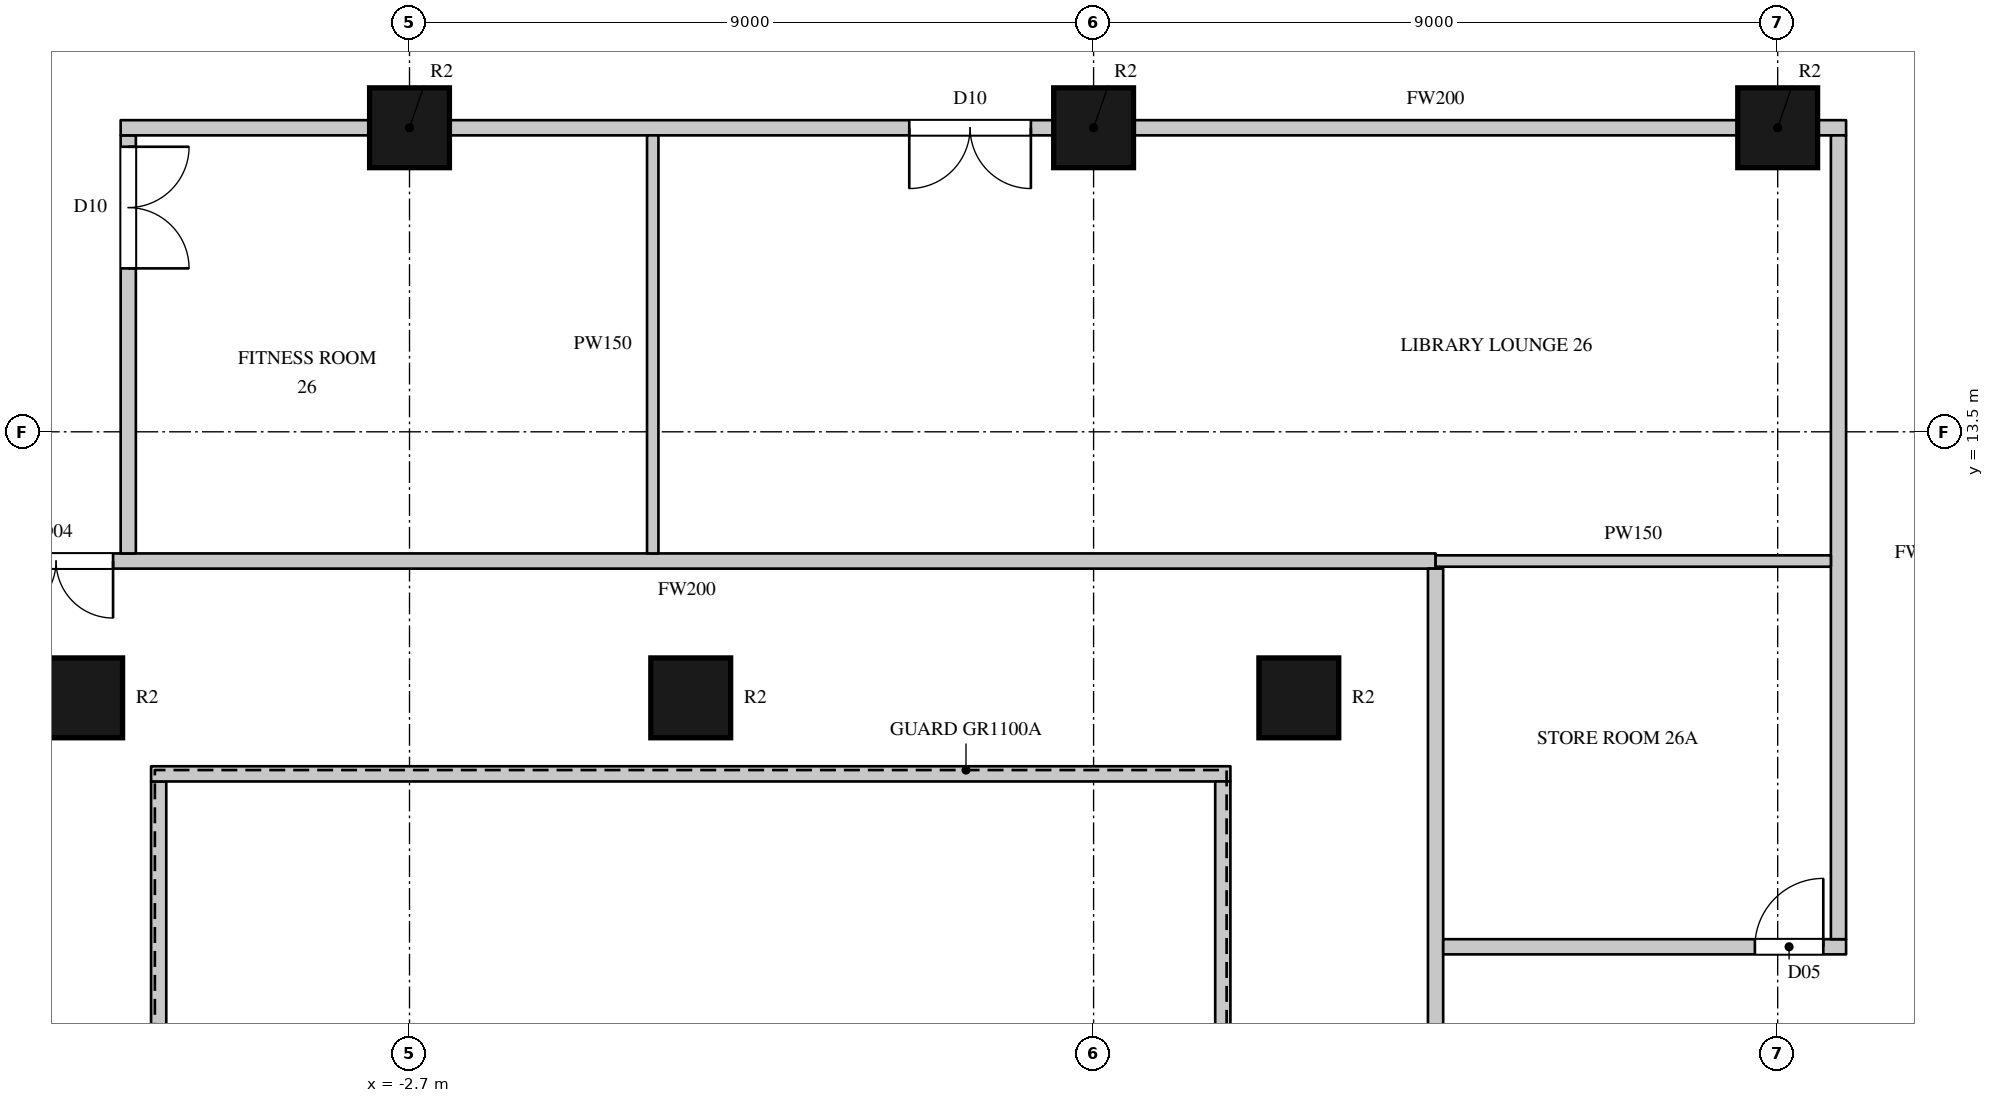
"""IFC4 building model, lengths in metres.
Left out: names, types, materials, properties, quantities, classifications, styles, units other than length and angle.
Written with IfcOpenShell. Run it as: python <this file> out.ifc"""

import sys

from ifc_helpers import new_model, si_unit, direction, frame, frame_2d, origin, origin_2d, place, context, subcontext, project, spatial, rectangle, circle, extrude, element, fill, save


model = new_model("IFC4")
c1 = context("Model", 3, precision=1e-05, world=origin(), true_north=direction((0.0, 1.0)))
c2 = subcontext(c1, "Body", "Model", "MODEL_VIEW")
j1 = project(units=[si_unit("LENGTHUNIT", "METRE"), si_unit("PLANEANGLEUNIT", "RADIAN")], contexts=[c1])
p1 = place(None, origin())
s1 = spatial("IfcSite", under=j1, at=p1, CompositionType="ELEMENT")
p2 = place(p1, origin())
s2 = spatial("IfcBuilding", under=s1, at=p2, CompositionType="ELEMENT")
p3 = place(p2, frame((0.0, 0.0, 123.9)))
s3 = spatial("IfcBuildingStorey", under=s2, at=p3, CompositionType="ELEMENT", Elevation=123.9)
for number, where, z_axis, x_axis in (
    (1, (-2.7, 17.5, 0.0), (0.0, 0.0, 1.0), (1.0, 0.0, 0.0)),
    (2, (6.3, 17.5, 0.0), (0.0, 0.0, 1.0), (1.0, 0.0, 0.0)),
    (3, (15.3, 17.5, 0.0), (0.0, 0.0, 1.0), (1.0, 0.0, 0.0)),
    (4, (-7.0, 10.0, 0.0), (0.0, 0.0, 1.0), (1.0, 0.0, 0.0)),
    (5, (1.0, 10.0, 0.0), (0.0, 0.0, 1.0), (1.0, 0.0, 0.0)),
    (6, (9.0, 10.0, 0.0), (0.0, 0.0, 1.0), (1.0, 0.0, 0.0)),
):
    element("IfcColumn", number, at=place(p3, frame(where, z_axis=z_axis, x_axis=x_axis)), inside=s3, PredefinedType="COLUMN", context=c2, shape_type="SweptSolid", body=[
        extrude(circle(Radius=0.525, at=origin_2d()), origin(), (0.0, 0.0, 1.0), 3.6),
    ])
p4 = place(p3, frame((-8.9, 11.8, 0.0), z_axis=(0.0, 0.0, 1.0), x_axis=(1.0, 0.0, 0.0)))
e7 = element("IfcWall", 7, at=p4, inside=s3, PredefinedType="PARTITIONING", context=c2, shape_type="SweptSolid", body=[
    extrude(rectangle(XDim=19.7, YDim=0.2, at=frame_2d((9.85, 0.0))), origin(), (0.0, 0.0, 1.0), 3.3),
])
p5 = place(p4, frame((0.8, 0.0, 0.0)))
e8 = element("IfcOpeningElement", 8, at=p5, cuts=e7, PredefinedType="OPENING", context=c2, shape_type="SweptSolid", body=[
    extrude(rectangle(XDim=1.5, YDim=2.2, at=frame_2d((0.75, 1.1))), frame((0.0, 0.11, 0.0), z_axis=(0.0, -1.0, 0.0), x_axis=(1.0, 0.0, 0.0)), (0.0, 0.0, 1.0), 0.22),
])
p6 = place(p3, frame((-6.4, 11.9, 0.0), z_axis=(0.0, 0.0, 1.0), x_axis=(0.0, 1.0, 0.0)))
e9 = element("IfcWall", 9, at=p6, inside=s3, PredefinedType="PARTITIONING", context=c2, shape_type="SweptSolid", body=[
    extrude(rectangle(XDim=5.5, YDim=0.2, at=frame_2d((2.75, 0.0))), origin(), (0.0, 0.0, 1.0), 3.3),
])
p7 = place(p6, frame((3.75, 0.0, 0.0)))
e10 = element("IfcOpeningElement", 10, at=p7, cuts=e9, PredefinedType="OPENING", context=c2, shape_type="SweptSolid", body=[
    extrude(rectangle(XDim=1.6, YDim=2.4, at=frame_2d((0.8, 1.2))), frame((0.0, 0.11, 0.0), z_axis=(0.0, -1.0, 0.0), x_axis=(1.0, 0.0, 0.0)), (0.0, 0.0, 1.0), 0.22),
])
p8 = place(p3, frame((-6.5, 17.5, 0.0), z_axis=(0.0, 0.0, 1.0), x_axis=(1.0, 0.0, 0.0)))
e11 = element("IfcWall", 11, at=p8, inside=s3, PredefinedType="PARTITIONING", context=c2, shape_type="SweptSolid", body=[
    extrude(rectangle(XDim=3.275, YDim=0.2, at=frame_2d((1.637, 0.0))), origin(), (0.0, 0.0, 1.0), 2.75),
])
p9 = place(p3, frame((-2.175, 17.5, 0.0), z_axis=(0.0, 0.0, 1.0), x_axis=(1.0, 0.0, 0.0)))
e12 = element("IfcWall", 12, at=p9, inside=s3, PredefinedType="PARTITIONING", context=c2, shape_type="SweptSolid", body=[
    extrude(rectangle(XDim=7.95, YDim=0.2, at=frame_2d((3.975, 0.0))), origin(), (0.0, 0.0, 1.0), 2.75),
])
p10 = place(p9, frame((6.05, 0.0, 0.0)))
e13 = element("IfcOpeningElement", 13, at=p10, cuts=e12, PredefinedType="OPENING", context=c2, shape_type="SweptSolid", body=[
    extrude(rectangle(XDim=1.6, YDim=2.4, at=frame_2d((0.8, 1.2))), frame((0.0, 0.11, 0.0), z_axis=(0.0, -1.0, 0.0), x_axis=(1.0, 0.0, 0.0)), (0.0, 0.0, 1.0), 0.22),
])
p11 = place(p3, frame((6.825, 17.5, 0.0), z_axis=(0.0, 0.0, 1.0), x_axis=(1.0, 0.0, 0.0)))
e14 = element("IfcWall", 14, at=p11, inside=s3, PredefinedType="PARTITIONING", context=c2, shape_type="SweptSolid", body=[
    extrude(rectangle(XDim=7.95, YDim=0.2, at=frame_2d((3.975, 0.0))), origin(), (0.0, 0.0, 1.0), 2.75),
])
p12 = place(p3, frame((15.825, 17.5, 0.0), z_axis=(0.0, 0.0, 1.0), x_axis=(1.0, 0.0, 0.0)))
e15 = element("IfcWall", 15, at=p12, inside=s3, PredefinedType="PARTITIONING", context=c2, shape_type="SweptSolid", body=[
    extrude(rectangle(XDim=0.375, YDim=0.2, at=frame_2d((0.188, 0.0))), origin(), (0.0, 0.0, 1.0), 3.3),
])
p13 = place(p3, frame((-6.0, -8.9, 0.0), z_axis=(0.0, 0.0, 1.0), x_axis=(0.0, 1.0, 0.0)))
e16 = element("IfcWall", 16, at=p13, inside=s3, PredefinedType="PARTITIONING", context=c2, shape_type="SweptSolid", body=[
    extrude(rectangle(XDim=17.8, YDim=0.2, at=frame_2d((8.9, 0.0))), origin(), (0.0, 0.0, 1.0), 3.3),
])
p14 = place(p3, frame((-6.1, 9.0, 0.0), z_axis=(0.0, 0.0, 1.0), x_axis=(1.0, 0.0, 0.0)))
e17 = element("IfcWall", 17, at=p14, inside=s3, PredefinedType="PARTITIONING", context=c2, shape_type="SweptSolid", body=[
    extrude(rectangle(XDim=14.2, YDim=0.2, at=frame_2d((7.1, 0.0))), origin(), (0.0, 0.0, 1.0), 3.3),
])
p15 = place(p3, frame((8.0, -8.9, 0.0), z_axis=(0.0, 0.0, 1.0), x_axis=(0.0, 1.0, 0.0)))
e18 = element("IfcWall", 18, at=p15, inside=s3, PredefinedType="PARTITIONING", context=c2, shape_type="SweptSolid", body=[
    extrude(rectangle(XDim=17.8, YDim=0.2, at=frame_2d((8.9, 0.0))), origin(), (0.0, 0.0, 1.0), 3.3),
])
p16 = place(p3, frame((10.799, -12.5, 0.0), z_axis=(0.0, 0.0, 1.0), x_axis=(0.0, 1.0, 0.0)))
e19 = element("IfcWall", 19, at=p16, inside=s3, PredefinedType="PARTITIONING", context=c2, shape_type="SweptSolid", body=[
    extrude(rectangle(XDim=24.2, YDim=0.2, at=frame_2d((12.1, 0.0))), origin(), (0.0, 0.0, 1.0), 3.3),
])
p17 = place(p16, frame((13.15, 0.0, 0.0)))
e20 = element("IfcOpeningElement", 20, at=p17, cuts=e19, PredefinedType="OPENING", context=c2, shape_type="SweptSolid", body=[
    extrude(rectangle(XDim=1.5, YDim=2.2, at=frame_2d((0.75, 1.1))), frame((0.0, 0.11, 0.0), z_axis=(0.0, -1.0, 0.0), x_axis=(1.0, 0.0, 0.0)), (0.0, 0.0, 1.0), 0.22),
])
p18 = place(p3, frame((10.9, 6.725, 0.0), z_axis=(0.0, 0.0, 1.0), x_axis=(1.0, 0.0, 0.0)))
e21 = element("IfcWall", 21, at=p18, inside=s3, PredefinedType="PARTITIONING", context=c2, shape_type="SweptSolid", body=[
    extrude(rectangle(XDim=5.3, YDim=0.2, at=frame_2d((2.65, 0.0))), origin(), (0.0, 0.0, 1.0), 3.3),
])
p19 = place(p18, frame((4.1, 0.0, 0.0)))
e22 = element("IfcOpeningElement", 22, at=p19, cuts=e21, PredefinedType="OPENING", context=c2, shape_type="SweptSolid", body=[
    extrude(rectangle(XDim=0.9, YDim=2.2, at=frame_2d((0.45, 1.1))), frame((0.0, 0.11, 0.0), z_axis=(0.0, -1.0, 0.0), x_axis=(1.0, 0.0, 0.0)), (0.0, 0.0, 1.0), 0.22),
])
p20 = place(p3, frame((16.1, 6.825, 0.0), z_axis=(0.0, 0.0, 1.0), x_axis=(0.0, 1.0, 0.0)))
e23 = element("IfcWall", 23, at=p20, inside=s3, PredefinedType="PARTITIONING", context=c2, shape_type="SweptSolid", body=[
    extrude(rectangle(XDim=10.575, YDim=0.2, at=frame_2d((5.288, 0.0))), origin(), (0.0, 0.0, 1.0), 3.3),
])
p21 = place(p3, frame((0.5, 11.9, 0.0), z_axis=(0.0, 0.0, 1.0), x_axis=(0.0, 1.0, 0.0)))
e24 = element("IfcWall", 24, at=p21, inside=s3, PredefinedType="PARTITIONING", context=c2, shape_type="SweptSolid", body=[
    extrude(rectangle(XDim=5.5, YDim=0.15, at=frame_2d((2.75, 0.0))), origin(), (0.0, 0.0, 1.0), 3.3),
])
p22 = place(p3, frame((10.8, 11.8, 0.0), z_axis=(0.0, 0.0, 1.0), x_axis=(1.0, 0.0, 0.0)))
e25 = element("IfcWall", 25, at=p22, inside=s3, PredefinedType="PARTITIONING", context=c2, shape_type="SweptSolid", body=[
    extrude(rectangle(XDim=5.2, YDim=0.15, at=frame_2d((2.6, 0.0))), origin(), (0.0, 0.0, 1.0), 3.3),
])
p23 = place(p5, origin())
e26 = element("IfcDoor", 26, at=p23, inside=s3, OperationType="DOUBLE_DOOR_SINGLE_SWING", PredefinedType="DOOR", context=c2, shape_type="SweptSolid", body=[
    extrude(rectangle(XDim=1.5, YDim=2.2, at=frame_2d((0.75, 1.1))), frame((0.0, 0.025, 0.0), z_axis=(0.0, -1.0, 0.0), x_axis=(1.0, 0.0, 0.0)), (0.0, 0.0, 1.0), 0.05),
])
fill(e8, e26)
p24 = place(p7, origin())
e27 = element("IfcDoor", 27, at=p24, inside=s3, OperationType="DOUBLE_DOOR_SINGLE_SWING", PredefinedType="DOOR", context=c2, shape_type="SweptSolid", body=[
    extrude(rectangle(XDim=1.6, YDim=2.4, at=frame_2d((0.8, 1.2))), frame((0.0, 0.025, 0.0), z_axis=(0.0, -1.0, 0.0), x_axis=(1.0, 0.0, 0.0)), (0.0, 0.0, 1.0), 0.05),
])
fill(e10, e27)
p25 = place(p10, origin())
e28 = element("IfcDoor", 28, at=p25, inside=s3, OperationType="DOUBLE_DOOR_SINGLE_SWING", PredefinedType="DOOR", context=c2, shape_type="SweptSolid", body=[
    extrude(rectangle(XDim=1.6, YDim=2.4, at=frame_2d((0.8, 1.2))), frame((0.0, 0.025, 0.0), z_axis=(0.0, -1.0, 0.0), x_axis=(1.0, 0.0, 0.0)), (0.0, 0.0, 1.0), 0.05),
])
fill(e13, e28)
p26 = place(p19, origin())
e29 = element("IfcDoor", 29, at=p26, inside=s3, OperationType="SINGLE_SWING_RIGHT", PredefinedType="DOOR", context=c2, shape_type="SweptSolid", body=[
    extrude(rectangle(XDim=0.9, YDim=2.2, at=frame_2d((0.45, 1.1))), frame((0.0, 0.025, 0.0), z_axis=(0.0, -1.0, 0.0), x_axis=(1.0, 0.0, 0.0)), (0.0, 0.0, 1.0), 0.05),
])
fill(e22, e29)
save(model, sys.argv[1])
